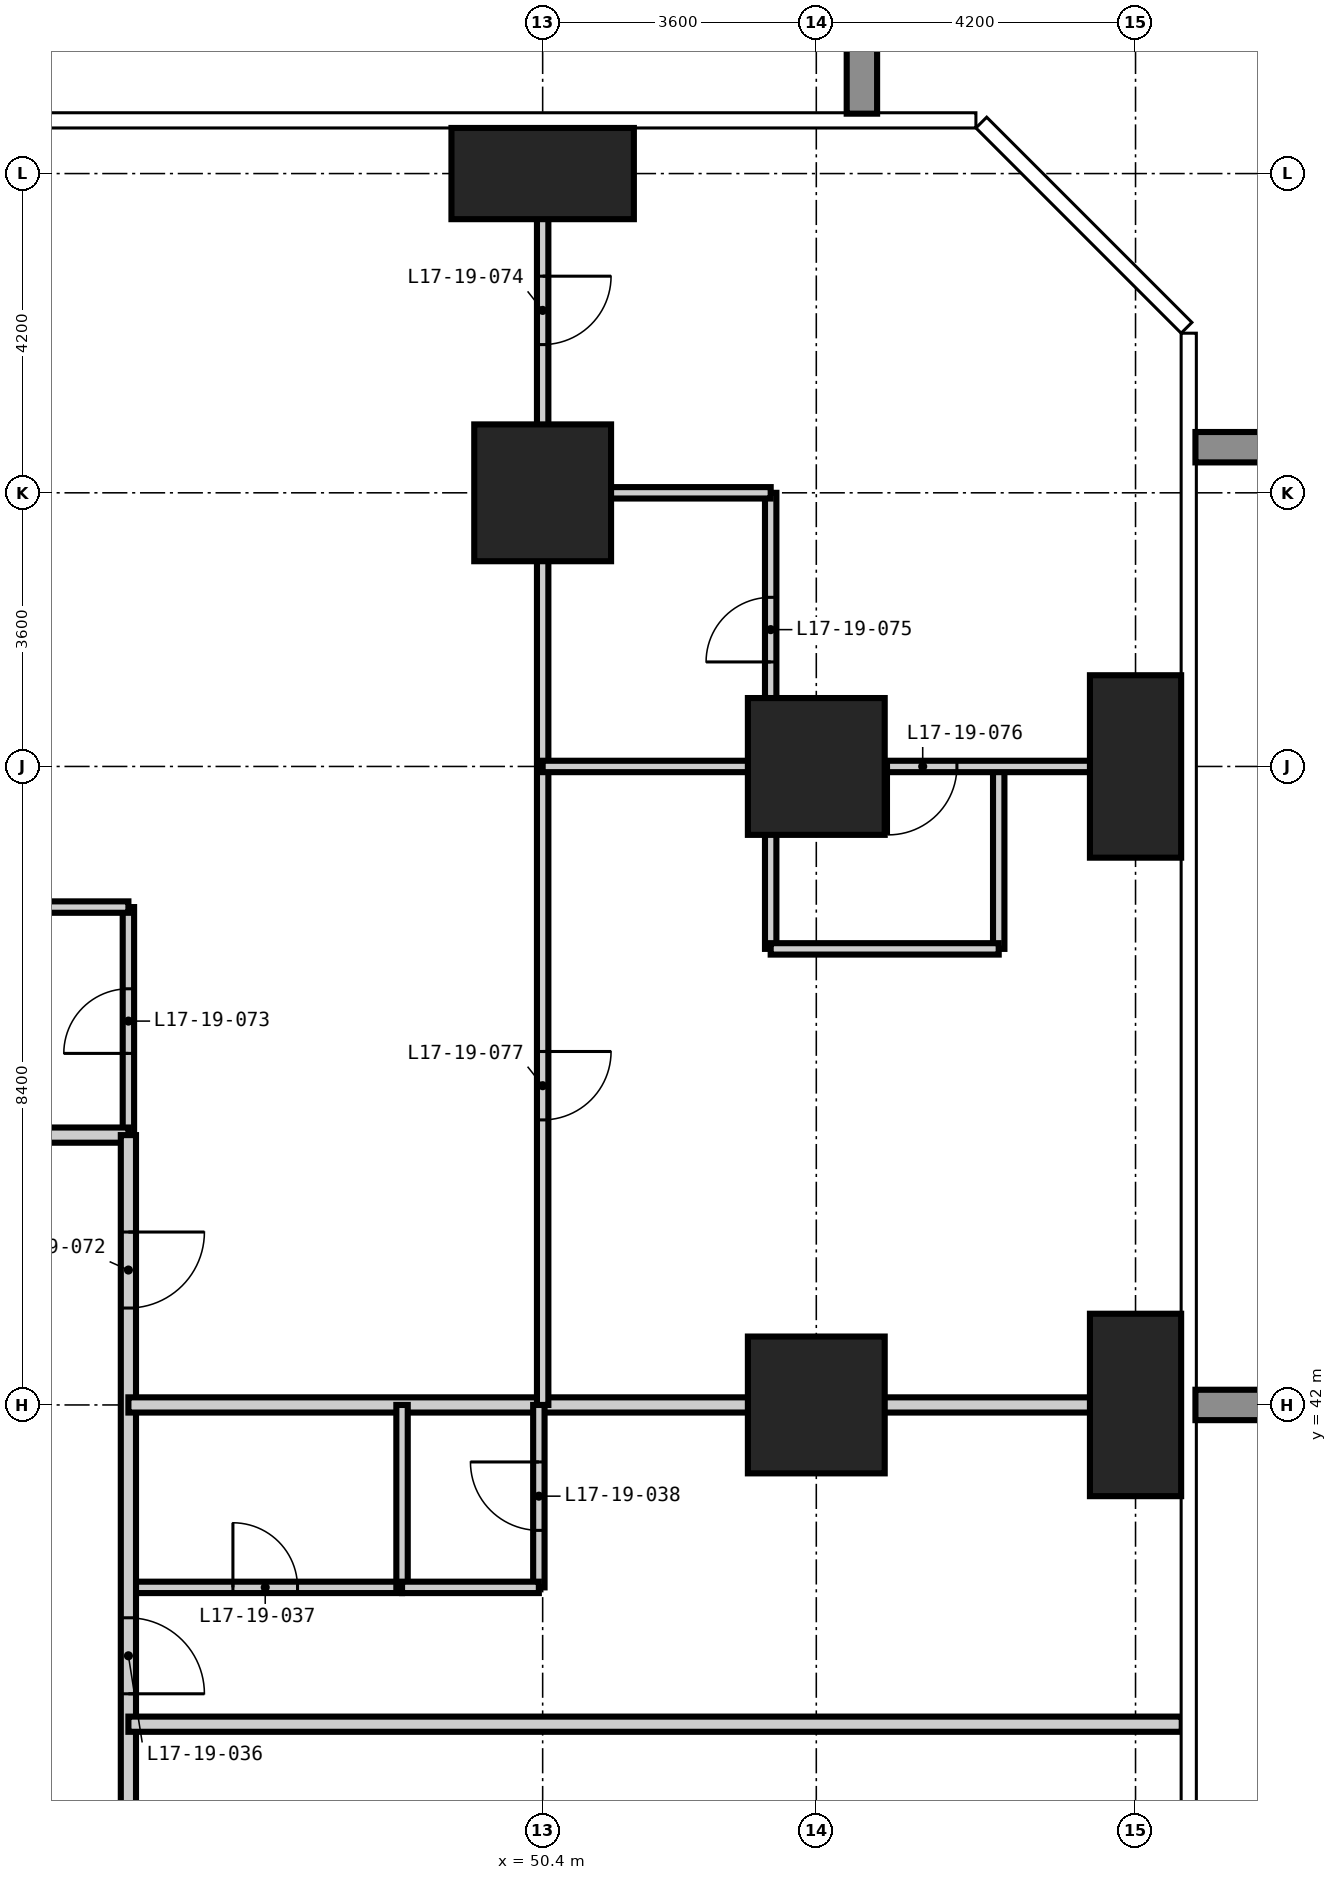
"""IFC4 building model, lengths in metres.
Left out: names, types, materials, properties, quantities, classifications, styles, units other than length and angle.
Written with IfcOpenShell. Run it as: python <this file> out.ifc"""

import sys

from ifc_helpers import new_model, si_unit, direction, frame, frame_2d, origin, origin_2d, place, context, subcontext, project, spatial, rectangle, extrude, element, fill, save


model = new_model("IFC4")
c1 = context("Model", 3, precision=1e-05, world=origin(), true_north=direction((0.0, 1.0)))
c2 = subcontext(c1, "Body", "Model", "MODEL_VIEW")
j1 = project(units=[si_unit("LENGTHUNIT", "METRE"), si_unit("PLANEANGLEUNIT", "RADIAN")], contexts=[c1])
p1 = place(None, origin())
s1 = spatial("IfcSite", under=j1, at=p1, CompositionType="ELEMENT")
p2 = place(p1, origin())
s2 = spatial("IfcBuilding", under=s1, at=p2, CompositionType="ELEMENT")
p3 = place(p2, frame((0.0, 0.0, 70.2)))
s3 = spatial("IfcBuildingStorey", under=s2, at=p3, CompositionType="ELEMENT", Elevation=70.2)
p4 = place(p3, frame((50.4, 54.0, -0.35), z_axis=(0.0, 0.0, 1.0), x_axis=(1.0, 0.0, 0.0)))
e1 = element("IfcColumn", 1, at=p4, inside=s3, PredefinedType="COLUMN", context=c2, shape_type="SweptSolid", body=[
    extrude(rectangle(XDim=1.8, YDim=1.8, at=origin_2d()), origin(), (0.0, 0.0, 1.0), 3.6),
])
p5 = place(p3, frame((50.4, 58.2, -0.35), z_axis=(0.0, 0.0, 1.0), x_axis=(1.0, 0.0, 0.0)))
e2 = element("IfcColumn", 2, at=p5, inside=s3, PredefinedType="COLUMN", context=c2, shape_type="SweptSolid", body=[
    extrude(rectangle(XDim=2.4, YDim=1.2, at=origin_2d()), origin(), (0.0, 0.0, 1.0), 3.6),
])
for number, where, z_axis, x_axis in (
    (3, (54.0, 42.0, -0.35), (0.0, 0.0, 1.0), (1.0, 0.0, 0.0)),
    (4, (54.0, 50.4, -0.35), (0.0, 0.0, 1.0), (1.0, 0.0, 0.0)),
):
    element("IfcColumn", number, at=place(p3, frame(where, z_axis=z_axis, x_axis=x_axis)), inside=s3, PredefinedType="COLUMN", context=c2, shape_type="SweptSolid", body=[
        extrude(rectangle(XDim=1.8, YDim=1.8, at=origin_2d()), origin(), (0.0, 0.0, 1.0), 3.6),
    ])
for number, where, z_axis, x_axis in (
    (5, (58.2, 42.0, -0.35), (0.0, 0.0, 1.0), (1.0, 0.0, 0.0)),
    (6, (58.2, 50.4, -0.35), (0.0, 0.0, 1.0), (1.0, 0.0, 0.0)),
):
    element("IfcColumn", number, at=place(p3, frame(where, z_axis=z_axis, x_axis=x_axis)), inside=s3, PredefinedType="COLUMN", context=c2, shape_type="SweptSolid", body=[
        extrude(rectangle(XDim=1.2, YDim=2.4, at=origin_2d()), origin(), (0.0, 0.0, 1.0), 3.6),
    ])
p6 = place(p3, frame((44.95, 45.55, 0.0), z_axis=(0.0, 0.0, 1.0), x_axis=(0.0, 1.0, 0.0)))
e7 = element("IfcWall", 7, at=p6, inside=s3, PredefinedType="PARTITIONING", context=c2, shape_type="SweptSolid", body=[
    extrude(rectangle(XDim=3.0, YDim=0.15, at=frame_2d((1.5, 0.0))), origin(), (0.0, 0.0, 1.0), 3.25),
])
p7 = place(p6, frame((1.075, 0.0, 0.0)))
e8 = element("IfcOpeningElement", 8, at=p7, cuts=e7, PredefinedType="OPENING", context=c2, shape_type="SweptSolid", body=[
    extrude(rectangle(XDim=0.85, YDim=2.1, at=frame_2d((0.425, 1.05))), frame((0.0, 0.085, 0.0), z_axis=(0.0, -1.0, 0.0), x_axis=(1.0, 0.0, 0.0)), (0.0, 0.0, 1.0), 0.17),
])
p8 = place(p3, frame((53.4, 50.4, 0.0), z_axis=(0.0, 0.0, 1.0), x_axis=(0.0, 1.0, 0.0)))
e9 = element("IfcWall", 9, at=p8, inside=s3, PredefinedType="PARTITIONING", context=c2, shape_type="SweptSolid", body=[
    extrude(rectangle(XDim=3.6, YDim=0.15, at=frame_2d((1.8, 0.0))), origin(), (0.0, 0.0, 1.0), 3.25),
])
p9 = place(p8, frame((1.375, 0.0, 0.0)))
e10 = element("IfcOpeningElement", 10, at=p9, cuts=e9, PredefinedType="OPENING", context=c2, shape_type="SweptSolid", body=[
    extrude(rectangle(XDim=0.85, YDim=2.1, at=frame_2d((0.425, 1.05))), frame((0.0, 0.085, 0.0), z_axis=(0.0, -1.0, 0.0), x_axis=(1.0, 0.0, 0.0)), (0.0, 0.0, 1.0), 0.17),
])
p10 = place(p3, frame((44.95, 39.6, 0.0), z_axis=(0.0, 0.0, 1.0), x_axis=(1.0, 0.0, 0.0)))
e11 = element("IfcWall", 11, at=p10, inside=s3, PredefinedType="PARTITIONING", context=c2, shape_type="SweptSolid", body=[
    extrude(rectangle(XDim=3.6, YDim=0.15, at=frame_2d((1.8, 0.0))), origin(), (0.0, 0.0, 1.0), 3.25),
])
p11 = place(p10, frame((1.375, 0.0, 0.0)))
e12 = element("IfcOpeningElement", 12, at=p11, cuts=e11, PredefinedType="OPENING", context=c2, shape_type="SweptSolid", body=[
    extrude(rectangle(XDim=0.85, YDim=2.1, at=frame_2d((0.425, 1.05))), frame((0.0, 0.085, 0.0), z_axis=(0.0, -1.0, 0.0), x_axis=(1.0, 0.0, 0.0)), (0.0, 0.0, 1.0), 0.17),
])
p12 = place(p3, frame((42.0, 48.55, 0.0), z_axis=(0.0, 0.0, 1.0), x_axis=(1.0, 0.0, 0.0)))
e13 = element("IfcWall", 13, at=p12, inside=s3, PredefinedType="PARTITIONING", context=c2, shape_type="SweptSolid", body=[
    extrude(rectangle(XDim=2.95, YDim=0.15, at=frame_2d((1.475, 0.0))), origin(), (0.0, 0.0, 1.0), 3.25),
])
p13 = place(p3, frame((50.4, 54.0, 0.0), z_axis=(0.0, 0.0, 1.0), x_axis=(1.0, 0.0, 0.0)))
e14 = element("IfcWall", 14, at=p13, inside=s3, PredefinedType="PARTITIONING", context=c2, shape_type="SweptSolid", body=[
    extrude(rectangle(XDim=3.0, YDim=0.15, at=frame_2d((1.5, 0.0))), origin(), (0.0, 0.0, 1.0), 3.25),
])
p14 = place(p3, frame((12.65, 45.55, 0.0), z_axis=(0.0, 0.0, 1.0), x_axis=(1.0, 0.0, 0.0)))
e15 = element("IfcWall", 15, at=p14, inside=s3, PredefinedType="PARTITIONING", context=c2, shape_type="SweptSolid", body=[
    extrude(rectangle(XDim=32.3, YDim=0.2, at=frame_2d((16.15, 0.0))), origin(), (0.0, 0.0, 1.0), 3.25),
])
p15 = place(p14, frame((6.95, 0.0, 0.0)))
e16 = element("IfcOpeningElement", 16, at=p15, cuts=e15, PredefinedType="OPENING", context=c2, shape_type="SweptSolid", body=[
    extrude(rectangle(XDim=1.0, YDim=2.2, at=frame_2d((0.5, 1.1))), frame((0.0, 0.11, 0.0), z_axis=(0.0, -1.0, 0.0), x_axis=(1.0, 0.0, 0.0)), (0.0, 0.0, 1.0), 0.22),
])
p16 = place(p14, frame((10.85, 0.0, 0.0)))
e17 = element("IfcOpeningElement", 17, at=p16, cuts=e15, PredefinedType="OPENING", context=c2, shape_type="SweptSolid", body=[
    extrude(rectangle(XDim=1.0, YDim=2.2, at=frame_2d((0.5, 1.1))), frame((0.0, 0.11, 0.0), z_axis=(0.0, -1.0, 0.0), x_axis=(1.0, 0.0, 0.0)), (0.0, 0.0, 1.0), 0.22),
])
p17 = place(p14, frame((21.65, 0.0, 0.0)))
e18 = element("IfcOpeningElement", 18, at=p17, cuts=e15, PredefinedType="OPENING", context=c2, shape_type="SweptSolid", body=[
    extrude(rectangle(XDim=1.0, YDim=2.2, at=frame_2d((0.5, 1.1))), frame((0.0, 0.11, 0.0), z_axis=(0.0, -1.0, 0.0), x_axis=(1.0, 0.0, 0.0)), (0.0, 0.0, 1.0), 0.22),
])
p18 = place(p14, frame((25.55, 0.0, 0.0)))
e19 = element("IfcOpeningElement", 19, at=p18, cuts=e15, PredefinedType="OPENING", context=c2, shape_type="SweptSolid", body=[
    extrude(rectangle(XDim=1.0, YDim=2.2, at=frame_2d((0.5, 1.1))), frame((0.0, 0.11, 0.0), z_axis=(0.0, -1.0, 0.0), x_axis=(1.0, 0.0, 0.0)), (0.0, 0.0, 1.0), 0.22),
])
p19 = place(p3, frame((44.95, 45.55, 0.0), z_axis=(0.0, 0.0, 1.0), x_axis=(0.0, -1.0, 0.0)))
e20 = element("IfcWall", 20, at=p19, inside=s3, PredefinedType="PARTITIONING", context=c2, shape_type="SweptSolid", body=[
    extrude(rectangle(XDim=32.9, YDim=0.2, at=frame_2d((16.45, 0.0))), origin(), (0.0, 0.0, 1.0), 3.25),
])
p20 = place(p19, frame((24.95, 0.0, 0.0)))
e21 = element("IfcOpeningElement", 21, at=p20, cuts=e20, PredefinedType="OPENING", context=c2, shape_type="SweptSolid", body=[
    extrude(rectangle(XDim=1.0, YDim=2.2, at=frame_2d((0.5, 1.1))), frame((0.0, 0.11, 0.0), z_axis=(0.0, -1.0, 0.0), x_axis=(1.0, 0.0, 0.0)), (0.0, 0.0, 1.0), 0.22),
])
p21 = place(p19, frame((21.05, 0.0, 0.0)))
e22 = element("IfcOpeningElement", 22, at=p21, cuts=e20, PredefinedType="OPENING", context=c2, shape_type="SweptSolid", body=[
    extrude(rectangle(XDim=1.0, YDim=2.2, at=frame_2d((0.5, 1.1))), frame((0.0, 0.11, 0.0), z_axis=(0.0, -1.0, 0.0), x_axis=(1.0, 0.0, 0.0)), (0.0, 0.0, 1.0), 0.22),
])
p22 = place(p19, frame((10.25, 0.0, 0.0)))
e23 = element("IfcOpeningElement", 23, at=p22, cuts=e20, PredefinedType="OPENING", context=c2, shape_type="SweptSolid", body=[
    extrude(rectangle(XDim=1.0, YDim=2.2, at=frame_2d((0.5, 1.1))), frame((0.0, 0.11, 0.0), z_axis=(0.0, -1.0, 0.0), x_axis=(1.0, 0.0, 0.0)), (0.0, 0.0, 1.0), 0.22),
])
p23 = place(p19, frame((6.35, 0.0, 0.0)))
e24 = element("IfcOpeningElement", 24, at=p23, cuts=e20, PredefinedType="OPENING", context=c2, shape_type="SweptSolid", body=[
    extrude(rectangle(XDim=1.0, YDim=2.2, at=frame_2d((0.5, 1.1))), frame((0.0, 0.11, 0.0), z_axis=(0.0, -1.0, 0.0), x_axis=(1.0, 0.0, 0.0)), (0.0, 0.0, 1.0), 0.22),
])
p24 = place(p19, frame((30.325, 0.0, 0.0)))
e25 = element("IfcOpeningElement", 25, at=p24, cuts=e20, PredefinedType="OPENING", context=c2, shape_type="SweptSolid", body=[
    extrude(rectangle(XDim=1.0, YDim=2.2, at=frame_2d((0.5, 1.1))), frame((0.0, 0.11, 0.0), z_axis=(0.0, -1.0, 0.0), x_axis=(1.0, 0.0, 0.0)), (0.0, 0.0, 1.0), 0.22),
])
p25 = place(p19, frame((1.275, 0.0, 0.0)))
e26 = element("IfcOpeningElement", 26, at=p25, cuts=e20, PredefinedType="OPENING", context=c2, shape_type="SweptSolid", body=[
    extrude(rectangle(XDim=1.0, YDim=2.2, at=frame_2d((0.5, 1.1))), frame((0.0, 0.11, 0.0), z_axis=(0.0, -1.0, 0.0), x_axis=(1.0, 0.0, 0.0)), (0.0, 0.0, 1.0), 0.22),
])
p26 = place(p3, frame((44.95, 37.8, 0.0), z_axis=(0.0, 0.0, 1.0), x_axis=(1.0, 0.0, 0.0)))
e27 = element("IfcWall", 27, at=p26, inside=s3, PredefinedType="PARTITIONING", context=c2, shape_type="SweptSolid", body=[
    extrude(rectangle(XDim=13.858, YDim=0.2, at=frame_2d((6.929, 0.0))), origin(), (0.0, 0.0, 1.0), 3.25),
])
p27 = place(p3, frame((44.95, 42.0, 0.0), z_axis=(0.0, 0.0, 1.0), x_axis=(1.0, 0.0, 0.0)))
e28 = element("IfcWall", 28, at=p27, inside=s3, PredefinedType="PARTITIONING", context=c2, shape_type="SweptSolid", body=[
    extrude(rectangle(XDim=5.4, YDim=0.2, at=frame_2d((2.7, 0.0))), origin(), (0.0, 0.0, 1.0), 3.25),
])
p28 = place(p3, frame((50.4, 42.0, 0.0), z_axis=(0.0, 0.0, 1.0), x_axis=(1.0, 0.0, 0.0)))
e29 = element("IfcWall", 29, at=p28, inside=s3, PredefinedType="PARTITIONING", context=c2, shape_type="SweptSolid", body=[
    extrude(rectangle(XDim=8.408, YDim=0.2, at=frame_2d((4.204, 0.0))), origin(), (0.0, 0.0, 1.0), 3.25),
])
p29 = place(p3, frame((48.55, 39.6, 0.0), z_axis=(0.0, 0.0, 1.0), x_axis=(0.0, 1.0, 0.0)))
e30 = element("IfcWall", 30, at=p29, inside=s3, PredefinedType="PARTITIONING", context=c2, shape_type="SweptSolid", body=[
    extrude(rectangle(XDim=2.4, YDim=0.15, at=frame_2d((1.2, 0.0))), origin(), (0.0, 0.0, 1.0), 3.25),
])
p30 = place(p3, frame((50.35, 39.6, 0.0), z_axis=(0.0, 0.0, 1.0), x_axis=(0.0, 1.0, 0.0)))
e31 = element("IfcWall", 31, at=p30, inside=s3, PredefinedType="PARTITIONING", context=c2, shape_type="SweptSolid", body=[
    extrude(rectangle(XDim=2.4, YDim=0.15, at=frame_2d((1.2, 0.0))), origin(), (0.0, 0.0, 1.0), 3.25),
])
p31 = place(p30, frame((0.75, 0.0, 0.0)))
e32 = element("IfcOpeningElement", 32, at=p31, cuts=e31, PredefinedType="OPENING", context=c2, shape_type="SweptSolid", body=[
    extrude(rectangle(XDim=0.9, YDim=2.1, at=frame_2d((0.45, 1.05))), frame((0.0, 0.085, 0.0), z_axis=(0.0, -1.0, 0.0), x_axis=(1.0, 0.0, 0.0)), (0.0, 0.0, 1.0), 0.17),
])
p32 = place(p3, frame((50.4, 42.0, 0.0), z_axis=(0.0, 0.0, 1.0), x_axis=(0.0, 1.0, 0.0)))
e33 = element("IfcWall", 33, at=p32, inside=s3, PredefinedType="PARTITIONING", context=c2, shape_type="SweptSolid", body=[
    extrude(rectangle(XDim=16.808, YDim=0.15, at=frame_2d((8.404, 0.0))), origin(), (0.0, 0.0, 1.0), 3.25),
])
p33 = place(p32, frame((13.95, 0.0, 0.0)))
e34 = element("IfcOpeningElement", 34, at=p33, cuts=e33, PredefinedType="OPENING", context=c2, shape_type="SweptSolid", body=[
    extrude(rectangle(XDim=0.9, YDim=2.1, at=frame_2d((0.45, 1.05))), frame((0.0, 0.085, 0.0), z_axis=(0.0, -1.0, 0.0), x_axis=(1.0, 0.0, 0.0)), (0.0, 0.0, 1.0), 0.17),
])
p34 = place(p32, frame((3.75, 0.0, 0.0)))
e35 = element("IfcOpeningElement", 35, at=p34, cuts=e33, PredefinedType="OPENING", context=c2, shape_type="SweptSolid", body=[
    extrude(rectangle(XDim=0.9, YDim=2.1, at=frame_2d((0.45, 1.05))), frame((0.0, 0.085, 0.0), z_axis=(0.0, -1.0, 0.0), x_axis=(1.0, 0.0, 0.0)), (0.0, 0.0, 1.0), 0.17),
])
for number, where, z_axis, x_axis in (
    (36, (53.4, 48.0, 0.0), (0.0, 0.0, 1.0), (0.0, 1.0, 0.0)),
    (37, (56.4, 48.0, 0.0), (0.0, 0.0, 1.0), (0.0, 1.0, 0.0)),
):
    element("IfcWall", number, at=place(p3, frame(where, z_axis=z_axis, x_axis=x_axis)), inside=s3, PredefinedType="PARTITIONING", context=c2, shape_type="SweptSolid", body=[
        extrude(rectangle(XDim=2.4, YDim=0.15, at=frame_2d((1.2, 0.0))), origin(), (0.0, 0.0, 1.0), 3.25),
    ])
p35 = place(p3, frame((48.55, 39.6, 0.0), z_axis=(0.0, 0.0, 1.0), x_axis=(1.0, 0.0, 0.0)))
e38 = element("IfcWall", 38, at=p35, inside=s3, PredefinedType="PARTITIONING", context=c2, shape_type="SweptSolid", body=[
    extrude(rectangle(XDim=1.8, YDim=0.15, at=frame_2d((0.9, 0.0))), origin(), (0.0, 0.0, 1.0), 3.25),
])
p36 = place(p3, frame((53.4, 48.0, 0.0), z_axis=(0.0, 0.0, 1.0), x_axis=(1.0, 0.0, 0.0)))
e39 = element("IfcWall", 39, at=p36, inside=s3, PredefinedType="PARTITIONING", context=c2, shape_type="SweptSolid", body=[
    extrude(rectangle(XDim=3.0, YDim=0.15, at=frame_2d((1.5, 0.0))), origin(), (0.0, 0.0, 1.0), 3.25),
])
p37 = place(p3, frame((50.4, 50.4, 0.0), z_axis=(0.0, 0.0, 1.0), x_axis=(1.0, 0.0, 0.0)))
e40 = element("IfcWall", 40, at=p37, inside=s3, PredefinedType="PARTITIONING", context=c2, shape_type="SweptSolid", body=[
    extrude(rectangle(XDim=8.408, YDim=0.15, at=frame_2d((4.204, 0.0))), origin(), (0.0, 0.0, 1.0), 3.25),
])
p38 = place(p37, frame((4.55, 0.0, 0.0)))
e41 = element("IfcOpeningElement", 41, at=p38, cuts=e40, PredefinedType="OPENING", context=c2, shape_type="SweptSolid", body=[
    extrude(rectangle(XDim=0.9, YDim=2.1, at=frame_2d((0.45, 1.05))), frame((0.0, 0.085, 0.0), z_axis=(0.0, -1.0, 0.0), x_axis=(1.0, 0.0, 0.0)), (0.0, 0.0, 1.0), 0.17),
])
p39 = place(p23, origin())
e42 = element("IfcDoor", 42, at=p39, inside=s3, OperationType="SINGLE_SWING_RIGHT", PredefinedType="DOOR", context=c2, shape_type="SweptSolid", body=[
    extrude(rectangle(XDim=1.0, YDim=2.2, at=frame_2d((0.5, 1.1))), frame((0.0, 0.025, 0.0), z_axis=(0.0, -1.0, 0.0), x_axis=(1.0, 0.0, 0.0)), (0.0, 0.0, 1.0), 0.05),
])
fill(e24, e42)
p40 = place(p11, origin())
e43 = element("IfcDoor", 43, at=p40, inside=s3, OperationType="SINGLE_SWING_LEFT", PredefinedType="DOOR", context=c2, shape_type="SweptSolid", body=[
    extrude(rectangle(XDim=0.85, YDim=2.1, at=frame_2d((0.425, 1.05))), frame((0.0, 0.025, 0.0), z_axis=(0.0, -1.0, 0.0), x_axis=(1.0, 0.0, 0.0)), (0.0, 0.0, 1.0), 0.05),
])
fill(e12, e43)
p41 = place(p31, origin())
e44 = element("IfcDoor", 44, at=p41, inside=s3, OperationType="SINGLE_SWING_RIGHT", PredefinedType="DOOR", context=c2, shape_type="SweptSolid", body=[
    extrude(rectangle(XDim=0.9, YDim=2.1, at=frame_2d((0.45, 1.05))), frame((0.0, 0.025, 0.0), z_axis=(0.0, -1.0, 0.0), x_axis=(1.0, 0.0, 0.0)), (0.0, 0.0, 1.0), 0.05),
])
fill(e32, e44)
p42 = place(p25, origin())
e45 = element("IfcDoor", 45, at=p42, inside=s3, OperationType="SINGLE_SWING_LEFT", PredefinedType="DOOR", context=c2, shape_type="SweptSolid", body=[
    extrude(rectangle(XDim=1.0, YDim=2.2, at=frame_2d((0.5, 1.1))), frame((0.0, 0.025, 0.0), z_axis=(0.0, -1.0, 0.0), x_axis=(1.0, 0.0, 0.0)), (0.0, 0.0, 1.0), 0.05),
])
fill(e26, e45)
p43 = place(p7, origin())
e46 = element("IfcDoor", 46, at=p43, inside=s3, OperationType="SINGLE_SWING_LEFT", PredefinedType="DOOR", context=c2, shape_type="SweptSolid", body=[
    extrude(rectangle(XDim=0.85, YDim=2.1, at=frame_2d((0.425, 1.05))), frame((0.0, 0.025, 0.0), z_axis=(0.0, -1.0, 0.0), x_axis=(1.0, 0.0, 0.0)), (0.0, 0.0, 1.0), 0.05),
])
fill(e8, e46)
p44 = place(p33, frame((0.9, 0.0, 0.0), z_axis=(0.0, 0.0, 1.0), x_axis=(-1.0, 0.0, 0.0)))
e47 = element("IfcDoor", 47, at=p44, inside=s3, OperationType="SINGLE_SWING_LEFT", PredefinedType="DOOR", context=c2, shape_type="SweptSolid", body=[
    extrude(rectangle(XDim=0.9, YDim=2.1, at=frame_2d((0.45, 1.05))), frame((0.0, 0.025, 0.0), z_axis=(0.0, -1.0, 0.0), x_axis=(1.0, 0.0, 0.0)), (0.0, 0.0, 1.0), 0.05),
])
fill(e34, e47)
p45 = place(p9, origin())
e48 = element("IfcDoor", 48, at=p45, inside=s3, OperationType="SINGLE_SWING_LEFT", PredefinedType="DOOR", context=c2, shape_type="SweptSolid", body=[
    extrude(rectangle(XDim=0.85, YDim=2.1, at=frame_2d((0.425, 1.05))), frame((0.0, 0.025, 0.0), z_axis=(0.0, -1.0, 0.0), x_axis=(1.0, 0.0, 0.0)), (0.0, 0.0, 1.0), 0.05),
])
fill(e10, e48)
p46 = place(p38, frame((0.9, 0.0, 0.0), z_axis=(0.0, 0.0, 1.0), x_axis=(-1.0, 0.0, 0.0)))
e49 = element("IfcDoor", 49, at=p46, inside=s3, OperationType="SINGLE_SWING_RIGHT", PredefinedType="DOOR", context=c2, shape_type="SweptSolid", body=[
    extrude(rectangle(XDim=0.9, YDim=2.1, at=frame_2d((0.45, 1.05))), frame((0.0, 0.025, 0.0), z_axis=(0.0, -1.0, 0.0), x_axis=(1.0, 0.0, 0.0)), (0.0, 0.0, 1.0), 0.05),
])
fill(e41, e49)
p47 = place(p34, frame((0.9, 0.0, 0.0), z_axis=(0.0, 0.0, 1.0), x_axis=(-1.0, 0.0, 0.0)))
e50 = element("IfcDoor", 50, at=p47, inside=s3, OperationType="SINGLE_SWING_LEFT", PredefinedType="DOOR", context=c2, shape_type="SweptSolid", body=[
    extrude(rectangle(XDim=0.9, YDim=2.1, at=frame_2d((0.45, 1.05))), frame((0.0, 0.025, 0.0), z_axis=(0.0, -1.0, 0.0), x_axis=(1.0, 0.0, 0.0)), (0.0, 0.0, 1.0), 0.05),
])
fill(e35, e50)
save(model, sys.argv[1])
